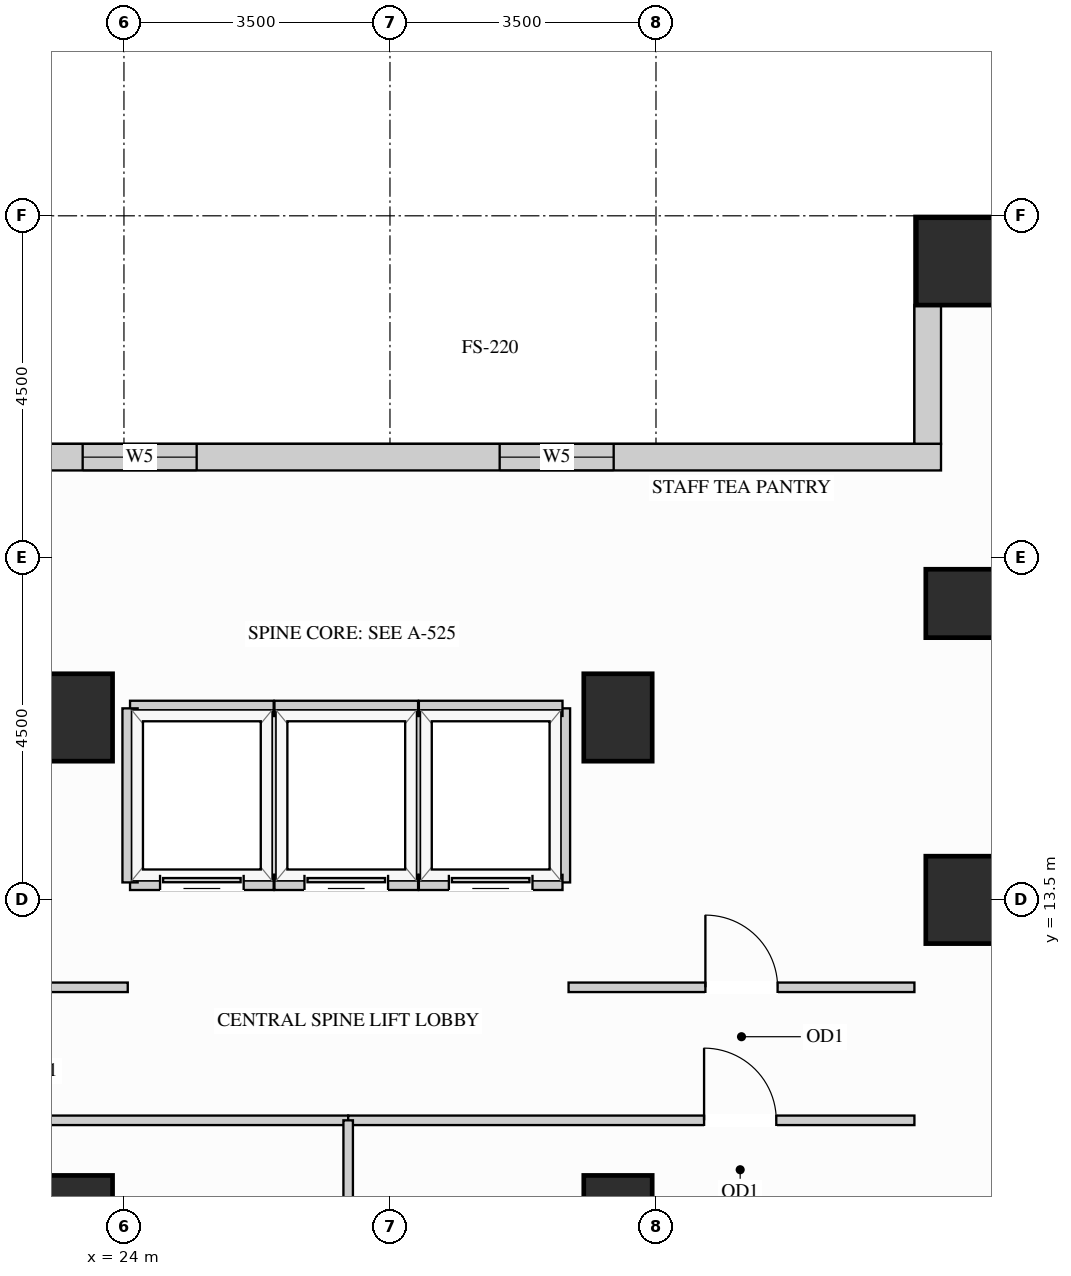
"""IFC4 building model, lengths in metres.
Left out: names, types, materials, properties, quantities, classifications, styles, units other than length and angle.
Written with IfcOpenShell. Run it as: python <this file> out.ifc"""

import sys

from ifc_helpers import new_model, si_unit, direction, frame, frame_2d, origin, origin_2d, place, context, subcontext, project, spatial, rectangle, extrude, source, transform, mapped, element, fill, save


model = new_model("IFC4")
c1 = context("Model", 3, precision=1e-05, world=origin(), true_north=direction((0.0, 1.0)))
c2 = subcontext(c1, "Body", "Model", "MODEL_VIEW")
j1 = project(units=[si_unit("LENGTHUNIT", "METRE"), si_unit("PLANEANGLEUNIT", "RADIAN")], contexts=[c1])
p1 = place(None, origin())
s1 = spatial("IfcSite", under=j1, at=p1, CompositionType="ELEMENT")
p2 = place(p1, origin())
s2 = spatial("IfcBuilding", under=s1, at=p2, CompositionType="ELEMENT")
p3 = place(p2, frame((0.0, 0.0, 102.6)))
s3 = spatial("IfcBuildingStorey", under=s2, at=p3, CompositionType="ELEMENT", Elevation=102.6)
m1 = source(origin(), c2, "Body", "SweptSolid", [
    extrude(rectangle(XDim=0.9, YDim=0.9, at=origin_2d()), origin(), (0.0, 0.0, 1.0), 3.38),
])
p4 = place(p3, frame((35.0, 17.4, 0.0), z_axis=(0.0, 0.0, 1.0), x_axis=(1.0, 0.0, 0.0)))
e1 = element("IfcColumn", 1, at=p4, inside=s3, PredefinedType="COLUMN", context=c2, shape_type="MappedRepresentation", body=[
    mapped(m1, transform((0.0, 0.0, 0.0), x_axis=(1.0, 0.0, 0.0), y_axis=(0.0, 1.0, 0.0), z_axis=(0.0, 0.0, 1.0))),
])
m2 = source(origin(), c2, "Body", "SweptSolid", [
    extrude(rectangle(XDim=0.9, YDim=1.15, at=origin_2d()), origin(), (0.0, 0.0, 1.0), 3.38),
])
for number, where, z_axis, x_axis in (
    (2, (35.0, 13.5, 0.0), (0.0, 0.0, 1.0), (1.0, 0.0, 0.0)),
    (3, (23.4, 15.9, 0.0), (0.0, 0.0, 1.0), (1.0, 0.0, 0.0)),
    (4, (23.4, 9.3, 0.0), (0.0, 0.0, 1.0), (1.0, 0.0, 0.0)),
    (5, (30.5, 15.9, 0.0), (0.0, 0.0, 1.0), (1.0, 0.0, 0.0)),
    (6, (30.5, 9.3, 0.0), (0.0, 0.0, 1.0), (1.0, 0.0, 0.0)),
):
    element("IfcColumn", number, at=place(p3, frame(where, z_axis=z_axis, x_axis=x_axis)), inside=s3, PredefinedType="COLUMN", context=c2, shape_type="MappedRepresentation", body=[
        mapped(m2, transform((0.0, 0.0, 0.0), x_axis=(1.0, 0.0, 0.0), y_axis=(0.0, 1.0, 0.0), z_axis=(0.0, 0.0, 1.0))),
    ])
m3 = source(origin(), c2, "Body", "SweptSolid", [
    extrude(rectangle(XDim=1.15, YDim=1.15, at=origin_2d()), origin(), (0.0, 0.0, 1.0), 3.38),
])
p5 = place(p3, frame((35.0, 21.9, 0.0), z_axis=(0.0, 0.0, 1.0), x_axis=(1.0, 0.0, 0.0)))
e7 = element("IfcColumn", 7, at=p5, inside=s3, PredefinedType="COLUMN", context=c2, shape_type="MappedRepresentation", body=[
    mapped(m3, transform((0.0, 0.0, 0.0), x_axis=(1.0, 0.0, 0.0), y_axis=(0.0, 1.0, 0.0), z_axis=(0.0, 0.0, 1.0))),
])
m4 = source(origin(), c2, "Body", "SweptSolid", [
    extrude(rectangle(XDim=1.829, YDim=0.35, at=frame_2d((0.915, 0.0))), origin(), (0.0, 0.0, 1.0), 3.365),
])
p6 = place(p3, frame((34.575, 21.327, 0.0), z_axis=(0.0, 0.0, 1.0), x_axis=(0.0, -1.0, 0.0)))
e8 = element("IfcWall", 8, at=p6, inside=s3, PredefinedType="SOLIDWALL", context=c2, shape_type="MappedRepresentation", body=[
    mapped(m4, transform((0.0, 0.0, 0.0), x_axis=(1.0, 0.0, 0.0), y_axis=(0.0, 1.0, 0.0), z_axis=(0.0, 0.0, 1.0))),
])
p7 = place(p3, frame((34.75, 19.325, 0.0), z_axis=(0.0, 0.0, 1.0), x_axis=(-1.0, 0.0, 0.0)))
e9 = element("IfcWall", 9, at=p7, inside=s3, PredefinedType="SOLIDWALL", context=c2, shape_type="SweptSolid", body=[
    extrude(rectangle(XDim=15.6, YDim=0.35, at=frame_2d((7.8, 0.0))), origin(), (0.0, 0.0, 1.0), 3.365),
])
p8 = place(p7, frame((4.307, 0.0, 0.78)))
e10 = element("IfcOpeningElement", 10, at=p8, cuts=e9, PredefinedType="OPENING", context=c2, shape_type="SweptSolid", body=[
    extrude(rectangle(XDim=1.5, YDim=2.0, at=frame_2d((0.75, 1.0))), frame((0.0, 0.185, 0.0), z_axis=(0.0, -1.0, 0.0), x_axis=(1.0, 0.0, 0.0)), (0.0, 0.0, 1.0), 0.37),
])
p9 = place(p7, frame((9.793, 0.0, 0.78)))
e11 = element("IfcOpeningElement", 11, at=p9, cuts=e9, PredefinedType="OPENING", context=c2, shape_type="SweptSolid", body=[
    extrude(rectangle(XDim=1.5, YDim=2.0, at=frame_2d((0.75, 1.0))), frame((0.0, 0.185, 0.0), z_axis=(0.0, -1.0, 0.0), x_axis=(1.0, 0.0, 0.0)), (0.0, 0.0, 1.0), 0.37),
])
p10 = place(p3, frame((29.85, 12.35, 0.0), z_axis=(0.0, 0.0, 1.0), x_axis=(1.0, 0.0, 0.0)))
e12 = element("IfcWall", 12, at=p10, inside=s3, PredefinedType="PARTITIONING", context=c2, shape_type="SweptSolid", body=[
    extrude(rectangle(XDim=4.55, YDim=0.125, at=frame_2d((2.275, 0.0))), origin(), (0.0, 0.0, 1.0), 3.365),
])
p11 = place(p10, frame((1.8, 0.0, 0.0)))
e13 = element("IfcOpeningElement", 13, at=p11, cuts=e12, PredefinedType="OPENING", context=c2, shape_type="SweptSolid", body=[
    extrude(rectangle(XDim=0.95, YDim=2.15, at=frame_2d((0.475, 1.075))), frame((0.0, 0.073, 0.0), z_axis=(0.0, -1.0, 0.0), x_axis=(1.0, 0.0, 0.0)), (0.0, 0.0, 1.0), 0.145),
])
p12 = place(p3, frame((19.5, 12.35, 0.0), z_axis=(0.0, 0.0, 1.0), x_axis=(1.0, 0.0, 0.0)))
e14 = element("IfcWall", 14, at=p12, inside=s3, PredefinedType="PARTITIONING", context=c2, shape_type="SweptSolid", body=[
    extrude(rectangle(XDim=4.55, YDim=0.125, at=frame_2d((2.275, 0.0))), origin(), (0.0, 0.0, 1.0), 3.365),
])
p13 = place(p12, frame((1.8, 0.0, 0.0)))
e15 = element("IfcOpeningElement", 15, at=p13, cuts=e14, PredefinedType="OPENING", context=c2, shape_type="SweptSolid", body=[
    extrude(rectangle(XDim=0.95, YDim=2.15, at=frame_2d((0.475, 1.075))), frame((0.0, 0.073, 0.0), z_axis=(0.0, -1.0, 0.0), x_axis=(1.0, 0.0, 0.0)), (0.0, 0.0, 1.0), 0.145),
])
p14 = place(p3, frame((19.5, 10.6, 0.0), z_axis=(0.0, 0.0, 1.0), x_axis=(1.0, 0.0, 0.0)))
e16 = element("IfcWall", 16, at=p14, inside=s3, PredefinedType="PARTITIONING", context=c2, shape_type="SweptSolid", body=[
    extrude(rectangle(XDim=7.45, YDim=0.125, at=frame_2d((3.725, 0.0))), origin(), (0.0, 0.0, 1.0), 3.365),
])
p15 = place(p14, frame((1.817, 0.0, 0.0)))
e17 = element("IfcOpeningElement", 17, at=p15, cuts=e16, PredefinedType="OPENING", context=c2, shape_type="SweptSolid", body=[
    extrude(rectangle(XDim=0.95, YDim=2.15, at=frame_2d((0.475, 1.075))), frame((0.0, 0.073, 0.0), z_axis=(0.0, -1.0, 0.0), x_axis=(1.0, 0.0, 0.0)), (0.0, 0.0, 1.0), 0.145),
])
p16 = place(p3, frame((26.95, 10.6, 0.0), z_axis=(0.0, 0.0, 1.0), x_axis=(1.0, 0.0, 0.0)))
e18 = element("IfcWall", 18, at=p16, inside=s3, PredefinedType="PARTITIONING", context=c2, shape_type="SweptSolid", body=[
    extrude(rectangle(XDim=7.45, YDim=0.125, at=frame_2d((3.725, 0.0))), origin(), (0.0, 0.0, 1.0), 3.365),
])
p17 = place(p16, frame((4.683, 0.0, 0.0)))
e19 = element("IfcOpeningElement", 19, at=p17, cuts=e18, PredefinedType="OPENING", context=c2, shape_type="SweptSolid", body=[
    extrude(rectangle(XDim=0.95, YDim=2.15, at=frame_2d((0.475, 1.075))), frame((0.0, 0.073, 0.0), z_axis=(0.0, -1.0, 0.0), x_axis=(1.0, 0.0, 0.0)), (0.0, 0.0, 1.0), 0.145),
])
m5 = source(origin(), c2, "Body", "SweptSolid", [
    extrude(rectangle(XDim=1.748, YDim=0.125, at=frame_2d((0.874, 0.0))), origin(), (0.0, 0.0, 1.0), 3.365),
])
p18 = place(p3, frame((26.95, 8.852, 0.0), z_axis=(0.0, 0.0, 1.0), x_axis=(0.0, 1.0, 0.0)))
e20 = element("IfcWall", 20, at=p18, inside=s3, PredefinedType="PARTITIONING", context=c2, shape_type="MappedRepresentation", body=[
    mapped(m5, transform((0.0, 0.0, 0.0), x_axis=(1.0, 0.0, 0.0), y_axis=(0.0, 1.0, 0.0), z_axis=(0.0, 0.0, 1.0))),
])
m6 = source(origin(), c2, "Body", "SweptSolid", [
    extrude(rectangle(XDim=2.29, YDim=0.2, at=frame_2d((1.145, 0.0))), origin(), (0.0, 0.0, 1.0), 3.365),
])
p19 = place(p3, frame((25.97, 13.73, 0.0), z_axis=(0.0, 0.0, 1.0), x_axis=(0.0, 1.0, 0.0)))
e21 = element("IfcWall", 21, at=p19, inside=s3, PredefinedType="PARTITIONING", context=c2, shape_type="MappedRepresentation", body=[
    mapped(m6, transform((0.0, 0.0, 0.0), x_axis=(1.0, 0.0, 0.0), y_axis=(0.0, 1.0, 0.0), z_axis=(0.0, 0.0, 1.0))),
])
m7 = source(origin(), c2, "Body", "SweptSolid", [
    extrude(rectangle(XDim=1.89, YDim=0.2, at=frame_2d((0.945, 0.0))), origin(), (0.0, 0.0, 1.0), 2.677),
])
p20 = place(p3, frame((24.08, 16.02, 0.0), z_axis=(0.0, 0.0, 1.0), x_axis=(1.0, 0.0, 0.0)))
e22 = element("IfcWall", 22, at=p20, inside=s3, PredefinedType="PARTITIONING", context=c2, shape_type="MappedRepresentation", body=[
    mapped(m7, transform((0.0, 0.0, 0.0), x_axis=(1.0, 0.0, 0.0), y_axis=(0.0, 1.0, 0.0), z_axis=(0.0, 0.0, 1.0))),
])
p21 = place(p3, frame((24.08, 13.73, 0.0), z_axis=(0.0, 0.0, 1.0), x_axis=(1.0, 0.0, 0.0)))
e23 = element("IfcWall", 23, at=p21, inside=s3, PredefinedType="PARTITIONING", context=c2, shape_type="SweptSolid", body=[
    extrude(rectangle(XDim=1.89, YDim=0.2, at=frame_2d((0.945, 0.0))), origin(), (0.0, 0.0, 1.0), 2.446),
])
p22 = place(p21, frame((0.395, 0.0, 0.0)))
e24 = element("IfcOpeningElement", 24, at=p22, cuts=e23, PredefinedType="OPENING", context=c2, shape_type="SweptSolid", body=[
    extrude(rectangle(XDim=1.1, YDim=2.2, at=frame_2d((0.55, 1.1))), frame((0.0, 0.11, 0.0), z_axis=(0.0, -1.0, 0.0), x_axis=(1.0, 0.0, 0.0)), (0.0, 0.0, 1.0), 0.22),
])
for number, where, z_axis, x_axis in (
    (25, (24.08, 13.73, 0.0), (0.0, 0.0, 1.0), (0.0, 1.0, 0.0)),
    (26, (27.87, 13.73, 0.0), (0.0, 0.0, 1.0), (0.0, 1.0, 0.0)),
):
    element("IfcWall", number, at=place(p3, frame(where, z_axis=z_axis, x_axis=x_axis)), inside=s3, PredefinedType="PARTITIONING", context=c2, shape_type="MappedRepresentation", body=[
        mapped(m6, transform((0.0, 0.0, 0.0), x_axis=(1.0, 0.0, 0.0), y_axis=(0.0, 1.0, 0.0), z_axis=(0.0, 0.0, 1.0))),
    ])
m8 = source(origin(), c2, "Body", "SweptSolid", [
    extrude(rectangle(XDim=1.89, YDim=0.2, at=frame_2d((0.945, 0.0))), origin(), (0.0, 0.0, 1.0), 2.677),
])
p23 = place(p3, frame((25.98, 16.02, 0.0), z_axis=(0.0, 0.0, 1.0), x_axis=(1.0, 0.0, 0.0)))
e27 = element("IfcWall", 27, at=p23, inside=s3, PredefinedType="PARTITIONING", context=c2, shape_type="MappedRepresentation", body=[
    mapped(m8, transform((0.0, 0.0, 0.0), x_axis=(1.0, 0.0, 0.0), y_axis=(0.0, 1.0, 0.0), z_axis=(0.0, 0.0, 1.0))),
])
p24 = place(p3, frame((25.98, 13.73, 0.0), z_axis=(0.0, 0.0, 1.0), x_axis=(1.0, 0.0, 0.0)))
e28 = element("IfcWall", 28, at=p24, inside=s3, PredefinedType="PARTITIONING", context=c2, shape_type="SweptSolid", body=[
    extrude(rectangle(XDim=1.89, YDim=0.2, at=frame_2d((0.945, 0.0))), origin(), (0.0, 0.0, 1.0), 2.446),
])
p25 = place(p24, frame((0.395, 0.0, 0.0)))
e29 = element("IfcOpeningElement", 29, at=p25, cuts=e28, PredefinedType="OPENING", context=c2, shape_type="SweptSolid", body=[
    extrude(rectangle(XDim=1.1, YDim=2.2, at=frame_2d((0.55, 1.1))), frame((0.0, 0.11, 0.0), z_axis=(0.0, -1.0, 0.0), x_axis=(1.0, 0.0, 0.0)), (0.0, 0.0, 1.0), 0.22),
])
p26 = place(p3, frame((29.77, 13.73, 0.0), z_axis=(0.0, 0.0, 1.0), x_axis=(0.0, 1.0, 0.0)))
e30 = element("IfcWall", 30, at=p26, inside=s3, PredefinedType="PARTITIONING", context=c2, shape_type="MappedRepresentation", body=[
    mapped(m6, transform((0.0, 0.0, 0.0), x_axis=(1.0, 0.0, 0.0), y_axis=(0.0, 1.0, 0.0), z_axis=(0.0, 0.0, 1.0))),
])
p27 = place(p3, frame((27.88, 16.02, 0.0), z_axis=(0.0, 0.0, 1.0), x_axis=(1.0, 0.0, 0.0)))
e31 = element("IfcWall", 31, at=p27, inside=s3, PredefinedType="PARTITIONING", context=c2, shape_type="MappedRepresentation", body=[
    mapped(m8, transform((0.0, 0.0, 0.0), x_axis=(1.0, 0.0, 0.0), y_axis=(0.0, 1.0, 0.0), z_axis=(0.0, 0.0, 1.0))),
])
p28 = place(p3, frame((27.88, 13.73, 0.0), z_axis=(0.0, 0.0, 1.0), x_axis=(1.0, 0.0, 0.0)))
e32 = element("IfcWall", 32, at=p28, inside=s3, PredefinedType="PARTITIONING", context=c2, shape_type="SweptSolid", body=[
    extrude(rectangle(XDim=1.89, YDim=0.2, at=frame_2d((0.945, 0.0))), origin(), (0.0, 0.0, 1.0), 2.446),
])
p29 = place(p28, frame((0.395, 0.0, 0.0)))
e33 = element("IfcOpeningElement", 33, at=p29, cuts=e32, PredefinedType="OPENING", context=c2, shape_type="SweptSolid", body=[
    extrude(rectangle(XDim=1.1, YDim=2.2, at=frame_2d((0.55, 1.1))), frame((0.0, 0.11, 0.0), z_axis=(0.0, -1.0, 0.0), x_axis=(1.0, 0.0, 0.0)), (0.0, 0.0, 1.0), 0.22),
])
m9 = source(origin(), c2, "Body", "SweptSolid", [
    extrude(rectangle(XDim=1.1, YDim=2.2, at=frame_2d((0.55, 1.1))), frame((0.0, 0.025, 0.0), z_axis=(0.0, -1.0, 0.0), x_axis=(1.0, 0.0, 0.0)), (0.0, 0.0, 1.0), 0.05),
])
p30 = place(p22, origin())
e34 = element("IfcDoor", 34, at=p30, inside=s3, OperationType="SLIDING_TO_LEFT", PredefinedType="DOOR", context=c2, shape_type="MappedRepresentation", body=[
    mapped(m9, transform((0.0, 0.0, 0.0), x_axis=(1.0, 0.0, 0.0), y_axis=(0.0, 1.0, 0.0), z_axis=(0.0, 0.0, 1.0))),
])
fill(e24, e34)
p31 = place(p25, origin())
e35 = element("IfcDoor", 35, at=p31, inside=s3, OperationType="SLIDING_TO_LEFT", PredefinedType="DOOR", context=c2, shape_type="MappedRepresentation", body=[
    mapped(m9, transform((0.0, 0.0, 0.0), x_axis=(1.0, 0.0, 0.0), y_axis=(0.0, 1.0, 0.0), z_axis=(0.0, 0.0, 1.0))),
])
fill(e29, e35)
p32 = place(p29, origin())
e36 = element("IfcDoor", 36, at=p32, inside=s3, OperationType="SLIDING_TO_LEFT", PredefinedType="DOOR", context=c2, shape_type="MappedRepresentation", body=[
    mapped(m9, transform((0.0, 0.0, 0.0), x_axis=(1.0, 0.0, 0.0), y_axis=(0.0, 1.0, 0.0), z_axis=(0.0, 0.0, 1.0))),
])
fill(e33, e36)
m10 = source(origin(), c2, "Body", "SweptSolid", [
    extrude(rectangle(XDim=0.95, YDim=2.15, at=frame_2d((0.475, 1.075))), frame((0.0, 0.025, 0.0), z_axis=(0.0, -1.0, 0.0), x_axis=(1.0, 0.0, 0.0)), (0.0, 0.0, 1.0), 0.05),
])
p33 = place(p11, origin())
e37 = element("IfcDoor", 37, at=p33, inside=s3, OperationType="SINGLE_SWING_LEFT", PredefinedType="DOOR", context=c2, shape_type="MappedRepresentation", body=[
    mapped(m10, transform((0.0, 0.0, 0.0), x_axis=(1.0, 0.0, 0.0), y_axis=(0.0, 1.0, 0.0), z_axis=(0.0, 0.0, 1.0))),
])
fill(e13, e37)
p34 = place(p17, origin())
e38 = element("IfcDoor", 38, at=p34, inside=s3, OperationType="SINGLE_SWING_LEFT", PredefinedType="DOOR", context=c2, shape_type="MappedRepresentation", body=[
    mapped(m10, transform((0.0, 0.0, 0.0), x_axis=(1.0, 0.0, 0.0), y_axis=(0.0, 1.0, 0.0), z_axis=(0.0, 0.0, 1.0))),
])
fill(e19, e38)
m11 = source(origin(), c2, "Body", "SweptSolid", [
    extrude(rectangle(XDim=1.5, YDim=2.0, at=frame_2d((0.75, 1.0))), frame((0.0, 0.03, 0.0), z_axis=(0.0, -1.0, 0.0), x_axis=(1.0, 0.0, 0.0)), (0.0, 0.0, 1.0), 0.06),
])
p35 = place(p8, origin())
e39 = element("IfcWindow", 39, at=p35, inside=s3, PartitioningType="SINGLE_PANEL", PredefinedType="WINDOW", context=c2, shape_type="MappedRepresentation", body=[
    mapped(m11, transform((0.0, 0.0, 0.0), x_axis=(1.0, 0.0, 0.0), y_axis=(0.0, 1.0, 0.0), z_axis=(0.0, 0.0, 1.0))),
])
fill(e10, e39)
p36 = place(p9, origin())
e40 = element("IfcWindow", 40, at=p36, inside=s3, PartitioningType="SINGLE_PANEL", PredefinedType="WINDOW", context=c2, shape_type="MappedRepresentation", body=[
    mapped(m11, transform((0.0, 0.0, 0.0), x_axis=(1.0, 0.0, 0.0), y_axis=(0.0, 1.0, 0.0), z_axis=(0.0, 0.0, 1.0))),
])
fill(e11, e40)
save(model, sys.argv[1])
